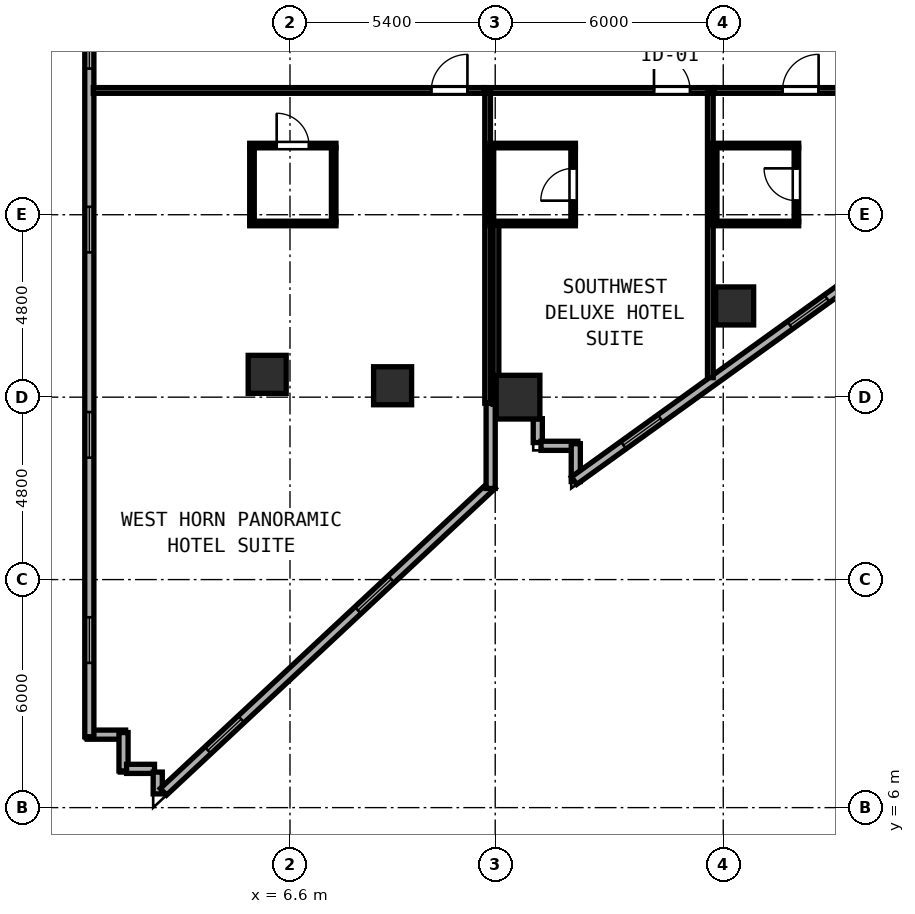
"""IFC4 building model, lengths in metres.
Left out: names, types, materials, properties, quantities, classifications, styles, units other than length and angle.
Written with IfcOpenShell. Run it as: python <this file> out.ifc"""

import sys

from ifc_helpers import new_model, si_unit, direction, frame, frame_2d, origin, origin_2d, place, context, subcontext, project, spatial, rectangle, hollow_rectangle, extrude, element, fill, save


model = new_model("IFC4")
c1 = context("Model", 3, precision=1e-05, world=origin(), true_north=direction((0.0, 1.0)))
c2 = subcontext(c1, "Body", "Model", "MODEL_VIEW")
j1 = project(units=[si_unit("LENGTHUNIT", "METRE"), si_unit("PLANEANGLEUNIT", "RADIAN")], contexts=[c1])
p1 = place(None, origin())
s1 = spatial("IfcSite", under=j1, at=p1, CompositionType="ELEMENT")
p2 = place(p1, origin())
s2 = spatial("IfcBuilding", under=s1, at=p2, CompositionType="ELEMENT")
p3 = place(p2, frame((0.0, 0.0, 70.4)))
s3 = spatial("IfcBuildingStorey", under=s2, at=p3, CompositionType="ELEMENT", Elevation=70.4)
p4 = place(p3, frame((12.6, 16.8, 0.0), z_axis=(0.0, 0.0, 1.0), x_axis=(1.0, 0.0, 0.0)))
e1 = element("IfcColumn", 1, at=p4, inside=s3, PredefinedType="COLUMN", context=c2, shape_type="SweptSolid", body=[
    extrude(hollow_rectangle(XDim=1.15, YDim=1.15, WallThickness=0.042, at=origin_2d()), origin(), (0.0, 0.0, 1.0), 3.8),
])
for number, where, z_axis, x_axis in (
    (2, (6.0, 17.4, 0.0), (0.0, 0.0, 1.0), (1.0, 0.0, 0.0)),
    (3, (18.3, 19.2, 0.0), (0.0, 0.0, 1.0), (1.0, 0.0, 0.0)),
    (4, (9.3, 17.1, 0.0), (0.0, 0.0, 1.0), (1.0, 0.0, 0.0)),
):
    element("IfcColumn", number, at=place(p3, frame(where, z_axis=z_axis, x_axis=x_axis)), inside=s3, PredefinedType="COLUMN", context=c2, shape_type="SweptSolid", body=[
        extrude(hollow_rectangle(XDim=1.0, YDim=1.0, WallThickness=0.038, at=origin_2d()), origin(), (0.0, 0.0, 1.0), 3.8),
    ])
for number, where, z_axis, x_axis in (
    (5, (1.265, 7.92, 0.0), (0.0, 0.0, 1.0), (1.0, 0.0, 0.0)),
    (6, (2.22, 7.975, 0.0), (0.0, 0.0, 1.0), (0.0, -1.0, 0.0)),
):
    element("IfcWall", number, at=place(p3, frame(where, z_axis=z_axis, x_axis=x_axis)), inside=s3, PredefinedType="SOLIDWALL", context=c2, shape_type="SweptSolid", body=[
        extrude(rectangle(XDim=1.01, YDim=0.24, at=frame_2d((0.505, 0.0))), origin(), (0.0, 0.0, 1.0), 3.6),
    ])
p5 = place(p3, frame((2.3, 7.02, 0.0), z_axis=(0.0, 0.0, 1.0), x_axis=(1.0, 0.0, 0.0)))
e7 = element("IfcWall", 7, at=p5, inside=s3, PredefinedType="SOLIDWALL", context=c2, shape_type="SweptSolid", body=[
    extrude(rectangle(XDim=0.735, YDim=0.24, at=frame_2d((0.367, 0.0))), origin(), (0.0, 0.0, 1.0), 3.6),
])
p6 = place(p3, frame((3.12, 6.935, 0.0), z_axis=(0.0, 0.0, 1.0), x_axis=(0.0, -1.0, 0.0)))
e8 = element("IfcWall", 8, at=p6, inside=s3, PredefinedType="SOLIDWALL", context=c2, shape_type="SweptSolid", body=[
    extrude(rectangle(XDim=0.574, YDim=0.24, at=frame_2d((0.287, 0.0))), origin(), (0.0, 0.0, 1.0), 3.6),
])
p7 = place(p3, frame((3.27, 6.416, 0.0), z_axis=(0.0, 0.0, 1.0), x_axis=(0.731064187858, 0.682308693505, 0.0)))
e9 = element("IfcWall", 9, at=p7, inside=s3, PredefinedType="SOLIDWALL", context=c2, shape_type="SweptSolid", body=[
    extrude(rectangle(XDim=11.833, YDim=0.24, at=frame_2d((5.916, 0.0))), origin(), (0.0, 0.0, 1.0), 3.6),
])
p8 = place(p7, frame((1.6, 0.0, 0.85)))
e10 = element("IfcOpeningElement", 10, at=p8, cuts=e9, PredefinedType="OPENING", context=c2, shape_type="SweptSolid", body=[
    extrude(rectangle(XDim=1.2, YDim=1.85, at=frame_2d((0.6, 0.925))), frame((0.0, 0.13, 0.0), z_axis=(0.0, -1.0, 0.0), x_axis=(1.0, 0.0, 0.0)), (0.0, 0.0, 1.0), 0.26),
])
p9 = place(p7, frame((7.0, 0.0, 0.85)))
e11 = element("IfcOpeningElement", 11, at=p9, cuts=e9, PredefinedType="OPENING", context=c2, shape_type="SweptSolid", body=[
    extrude(rectangle(XDim=1.2, YDim=1.85, at=frame_2d((0.6, 0.925))), frame((0.0, 0.13, 0.0), z_axis=(0.0, -1.0, 0.0), x_axis=(1.0, 0.0, 0.0)), (0.0, 0.0, 1.0), 0.26),
])
p10 = place(p3, frame((11.88, 14.397, 0.0), z_axis=(0.0, 0.0, 1.0), x_axis=(0.0, 1.0, 0.0)))
e12 = element("IfcWall", 12, at=p10, inside=s3, PredefinedType="SOLIDWALL", context=c2, shape_type="SweptSolid", body=[
    extrude(rectangle(XDim=2.243, YDim=0.24, at=frame_2d((1.121, 0.0))), origin(), (0.0, 0.0, 1.0), 3.6),
])
p11 = place(p3, frame((13.12, 16.233, 0.0), z_axis=(0.0, 0.0, 1.0), x_axis=(0.0, -1.0, 0.0)))
e13 = element("IfcWall", 13, at=p11, inside=s3, PredefinedType="SOLIDWALL", context=c2, shape_type="SweptSolid", body=[
    extrude(rectangle(XDim=0.628, YDim=0.24, at=frame_2d((0.314, 0.0))), origin(), (0.0, 0.0, 1.0), 3.6),
])
p12 = place(p3, frame((13.205, 15.52, 0.0), z_axis=(0.0, 0.0, 1.0), x_axis=(1.0, 0.0, 0.0)))
e14 = element("IfcWall", 14, at=p12, inside=s3, PredefinedType="SOLIDWALL", context=c2, shape_type="SweptSolid", body=[
    extrude(rectangle(XDim=0.97, YDim=0.24, at=frame_2d((0.485, 0.0))), origin(), (0.0, 0.0, 1.0), 3.6),
])
p13 = place(p3, frame((14.12, 15.575, 0.0), z_axis=(0.0, 0.0, 1.0), x_axis=(0.0, -1.0, 0.0)))
e15 = element("IfcWall", 15, at=p13, inside=s3, PredefinedType="SOLIDWALL", context=c2, shape_type="SweptSolid", body=[
    extrude(rectangle(XDim=0.996, YDim=0.24, at=frame_2d((0.498, 0.0))), origin(), (0.0, 0.0, 1.0), 3.6),
])
p14 = place(p3, frame((14.075, 14.602, 0.0), z_axis=(0.0, 0.0, 1.0), x_axis=(0.811543176492, 0.58429245476, 0.0)))
e16 = element("IfcWall", 16, at=p14, inside=s3, PredefinedType="SOLIDWALL", context=c2, shape_type="SweptSolid", body=[
    extrude(rectangle(XDim=11.531, YDim=0.24, at=frame_2d((5.765, 0.0))), origin(), (0.0, 0.0, 1.0), 3.097),
])
p15 = place(p14, frame((1.6, 0.0, 0.85)))
e17 = element("IfcOpeningElement", 17, at=p15, cuts=e16, PredefinedType="OPENING", context=c2, shape_type="SweptSolid", body=[
    extrude(rectangle(XDim=1.2, YDim=1.85, at=frame_2d((0.6, 0.925))), frame((0.0, 0.13, 0.0), z_axis=(0.0, -1.0, 0.0), x_axis=(1.0, 0.0, 0.0)), (0.0, 0.0, 1.0), 0.26),
])
p16 = place(p14, frame((7.0, 0.0, 0.85)))
e18 = element("IfcOpeningElement", 18, at=p16, cuts=e16, PredefinedType="OPENING", context=c2, shape_type="SweptSolid", body=[
    extrude(rectangle(XDim=1.2, YDim=1.85, at=frame_2d((0.6, 0.925))), frame((0.0, 0.13, 0.0), z_axis=(0.0, -1.0, 0.0), x_axis=(1.0, 0.0, 0.0)), (0.0, 0.0, 1.0), 0.26),
])
p17 = place(p3, frame((1.32, 28.808, 0.0), z_axis=(0.0, 0.0, 1.0), x_axis=(0.0, -1.0, 0.0)))
e19 = element("IfcWall", 19, at=p17, inside=s3, PredefinedType="SOLIDWALL", context=c2, shape_type="SweptSolid", body=[
    extrude(rectangle(XDim=20.943, YDim=0.24, at=frame_2d((10.472, 0.0))), origin(), (0.0, 0.0, 1.0), 3.6),
])
p18 = place(p17, frame((2.163, 0.0, 0.85)))
e20 = element("IfcOpeningElement", 20, at=p18, cuts=e19, PredefinedType="OPENING", context=c2, shape_type="SweptSolid", body=[
    extrude(rectangle(XDim=1.2, YDim=1.85, at=frame_2d((0.6, 0.925))), frame((0.0, 0.13, 0.0), z_axis=(0.0, -1.0, 0.0), x_axis=(1.0, 0.0, 0.0)), (0.0, 0.0, 1.0), 0.26),
])
p19 = place(p17, frame((7.0, 0.0, 0.85)))
e21 = element("IfcOpeningElement", 21, at=p19, cuts=e19, PredefinedType="OPENING", context=c2, shape_type="SweptSolid", body=[
    extrude(rectangle(XDim=1.2, YDim=1.85, at=frame_2d((0.6, 0.925))), frame((0.0, 0.13, 0.0), z_axis=(0.0, -1.0, 0.0), x_axis=(1.0, 0.0, 0.0)), (0.0, 0.0, 1.0), 0.26),
])
p20 = place(p17, frame((12.4, 0.0, 0.85)))
e22 = element("IfcOpeningElement", 22, at=p20, cuts=e19, PredefinedType="OPENING", context=c2, shape_type="SweptSolid", body=[
    extrude(rectangle(XDim=1.2, YDim=1.85, at=frame_2d((0.6, 0.925))), frame((0.0, 0.13, 0.0), z_axis=(0.0, -1.0, 0.0), x_axis=(1.0, 0.0, 0.0)), (0.0, 0.0, 1.0), 0.26),
])
p21 = place(p17, frame((17.8, 0.0, 0.85)))
e23 = element("IfcOpeningElement", 23, at=p21, cuts=e19, PredefinedType="OPENING", context=c2, shape_type="SweptSolid", body=[
    extrude(rectangle(XDim=1.2, YDim=1.85, at=frame_2d((0.6, 0.925))), frame((0.0, 0.13, 0.0), z_axis=(0.0, -1.0, 0.0), x_axis=(1.0, 0.0, 0.0)), (0.0, 0.0, 1.0), 0.26),
])
p22 = place(p3, frame((11.7, 24.87, 0.0), z_axis=(0.0, 0.0, 1.0), x_axis=(1.0, 0.0, 0.0)))
e24 = element("IfcWall", 24, at=p22, inside=s3, PredefinedType="PARTITIONING", context=c2, shape_type="SweptSolid", body=[
    extrude(rectangle(XDim=6.06, YDim=0.15, at=frame_2d((3.03, 0.0))), origin(), (0.0, 0.0, 1.0), 3.185),
])
p23 = place(p22, frame((5.427, 0.0, 0.0), z_axis=(0.0, 0.0, 1.0), x_axis=(-1.0, 0.0, 0.0)))
e25 = element("IfcOpeningElement", 25, at=p23, cuts=e24, PredefinedType="OPENING", context=c2, shape_type="SweptSolid", body=[
    extrude(rectangle(XDim=0.95, YDim=2.18, at=frame_2d((0.475, 1.09))), frame((0.0, 0.085, 0.0), z_axis=(0.0, -1.0, 0.0), x_axis=(1.0, 0.0, 0.0)), (0.0, 0.0, 1.0), 0.17),
])
p24 = place(p3, frame((11.8, 16.642, 0.0), z_axis=(0.0, 0.0, 1.0), x_axis=(0.0, 1.0, 0.0)))
e26 = element("IfcWall", 26, at=p24, inside=s3, PredefinedType="PARTITIONING", context=c2, shape_type="SweptSolid", body=[
    extrude(rectangle(XDim=8.168, YDim=0.15, at=frame_2d((4.084, 0.0))), origin(), (0.0, 0.0, 1.0), 3.6),
])
p25 = place(p3, frame((17.66, 17.312, 0.0), z_axis=(0.0, 0.0, 1.0), x_axis=(0.0, 1.0, 0.0)))
e27 = element("IfcWall", 27, at=p25, inside=s3, PredefinedType="PARTITIONING", context=c2, shape_type="SweptSolid", body=[
    extrude(rectangle(XDim=7.498, YDim=0.15, at=frame_2d((3.749, 0.0))), origin(), (0.0, 0.0, 1.0), 3.6),
])
for number, where, z_axis, x_axis in (
    (28, (11.86, 23.42, 0.0), (0.0, 0.0, 1.0), (1.0, 0.0, 0.0)),
    (29, (11.86, 21.37, 0.0), (0.0, 0.0, 1.0), (1.0, 0.0, 0.0)),
):
    element("IfcWall", number, at=place(p3, frame(where, z_axis=z_axis, x_axis=x_axis)), inside=s3, PredefinedType="PARTITIONING", context=c2, shape_type="SweptSolid", body=[
        extrude(rectangle(XDim=2.25, YDim=0.12, at=frame_2d((1.125, 0.0))), origin(), (0.0, 0.0, 1.0), 3.6),
    ])
p26 = place(p3, frame((11.9, 21.415, 0.0), z_axis=(0.0, 0.0, 1.0), x_axis=(0.0, 1.0, 0.0)))
e30 = element("IfcWall", 30, at=p26, inside=s3, PredefinedType="PARTITIONING", context=c2, shape_type="SweptSolid", body=[
    extrude(rectangle(XDim=1.96, YDim=0.12, at=frame_2d((0.98, 0.0))), origin(), (0.0, 0.0, 1.0), 3.6),
])
p27 = place(p3, frame((14.05, 21.415, 0.0), z_axis=(0.0, 0.0, 1.0), x_axis=(0.0, 1.0, 0.0)))
e31 = element("IfcWall", 31, at=p27, inside=s3, PredefinedType="PARTITIONING", context=c2, shape_type="SweptSolid", body=[
    extrude(rectangle(XDim=1.96, YDim=0.12, at=frame_2d((0.98, 0.0))), origin(), (0.0, 0.0, 1.0), 3.6),
])
p28 = place(p27, frame((0.555, 0.0, 0.0)))
e32 = element("IfcOpeningElement", 32, at=p28, cuts=e31, PredefinedType="OPENING", context=c2, shape_type="SweptSolid", body=[
    extrude(rectangle(XDim=0.85, YDim=2.1, at=frame_2d((0.425, 1.05))), frame((0.0, 0.07, 0.0), z_axis=(0.0, -1.0, 0.0), x_axis=(1.0, 0.0, 0.0)), (0.0, 0.0, 1.0), 0.14),
])
p29 = place(p3, frame((17.762, 24.87, 0.0), z_axis=(0.0, 0.0, 1.0), x_axis=(1.0, 0.0, 0.0)))
e33 = element("IfcWall", 33, at=p29, inside=s3, PredefinedType="PARTITIONING", context=c2, shape_type="SweptSolid", body=[
    extrude(rectangle(XDim=6.338, YDim=0.15, at=frame_2d((3.169, 0.0))), origin(), (0.0, 0.0, 1.0), 3.185),
])
p30 = place(p29, frame((2.747, 0.0, 0.0), z_axis=(0.0, 0.0, 1.0), x_axis=(-1.0, 0.0, 0.0)))
e34 = element("IfcOpeningElement", 34, at=p30, cuts=e33, PredefinedType="OPENING", context=c2, shape_type="SweptSolid", body=[
    extrude(rectangle(XDim=0.95, YDim=2.18, at=frame_2d((0.475, 1.09))), frame((0.0, 0.085, 0.0), z_axis=(0.0, -1.0, 0.0), x_axis=(1.0, 0.0, 0.0)), (0.0, 0.0, 1.0), 0.17),
])
for number, where, z_axis, x_axis in (
    (35, (17.72, 23.42, 0.0), (0.0, 0.0, 1.0), (1.0, 0.0, 0.0)),
    (36, (17.72, 21.37, 0.0), (0.0, 0.0, 1.0), (1.0, 0.0, 0.0)),
):
    element("IfcWall", number, at=place(p3, frame(where, z_axis=z_axis, x_axis=x_axis)), inside=s3, PredefinedType="PARTITIONING", context=c2, shape_type="SweptSolid", body=[
        extrude(rectangle(XDim=2.265, YDim=0.12, at=frame_2d((1.133, 0.0))), origin(), (0.0, 0.0, 1.0), 3.6),
    ])
p31 = place(p3, frame((17.775, 21.415, 0.0), z_axis=(0.0, 0.0, 1.0), x_axis=(0.0, 1.0, 0.0)))
e37 = element("IfcWall", 37, at=p31, inside=s3, PredefinedType="PARTITIONING", context=c2, shape_type="SweptSolid", body=[
    extrude(rectangle(XDim=1.96, YDim=0.12, at=frame_2d((0.98, 0.0))), origin(), (0.0, 0.0, 1.0), 3.6),
])
p32 = place(p3, frame((19.925, 21.415, 0.0), z_axis=(0.0, 0.0, 1.0), x_axis=(0.0, 1.0, 0.0)))
e38 = element("IfcWall", 38, at=p32, inside=s3, PredefinedType="PARTITIONING", context=c2, shape_type="SweptSolid", body=[
    extrude(rectangle(XDim=1.96, YDim=0.12, at=frame_2d((0.98, 0.0))), origin(), (0.0, 0.0, 1.0), 3.6),
])
p33 = place(p32, frame((0.555, 0.0, 0.0)))
e39 = element("IfcOpeningElement", 39, at=p33, cuts=e38, PredefinedType="OPENING", context=c2, shape_type="SweptSolid", body=[
    extrude(rectangle(XDim=0.85, YDim=2.1, at=frame_2d((0.425, 1.05))), frame((0.0, 0.07, 0.0), z_axis=(0.0, -1.0, 0.0), x_axis=(1.0, 0.0, 0.0)), (0.0, 0.0, 1.0), 0.14),
])
p34 = place(p3, frame((1.425, 24.87, 0.0), z_axis=(0.0, 0.0, 1.0), x_axis=(1.0, 0.0, 0.0)))
e40 = element("IfcWall", 40, at=p34, inside=s3, PredefinedType="PARTITIONING", context=c2, shape_type="SweptSolid", body=[
    extrude(rectangle(XDim=10.273, YDim=0.15, at=frame_2d((5.136, 0.0))), origin(), (0.0, 0.0, 1.0), 3.6),
])
p35 = place(p34, frame((9.844, 0.0, 0.0), z_axis=(0.0, 0.0, 1.0), x_axis=(-1.0, 0.0, 0.0)))
e41 = element("IfcOpeningElement", 41, at=p35, cuts=e40, PredefinedType="OPENING", context=c2, shape_type="SweptSolid", body=[
    extrude(rectangle(XDim=0.95, YDim=2.18, at=frame_2d((0.475, 1.09))), frame((0.0, 0.085, 0.0), z_axis=(0.0, -1.0, 0.0), x_axis=(1.0, 0.0, 0.0)), (0.0, 0.0, 1.0), 0.17),
])
p36 = place(p3, frame((12.02, 16.612, 0.0), z_axis=(0.0, 0.0, 1.0), x_axis=(0.0, 1.0, 0.0)))
e42 = element("IfcWall", 42, at=p36, inside=s3, PredefinedType="PARTITIONING", context=c2, shape_type="SweptSolid", body=[
    extrude(rectangle(XDim=4.713, YDim=0.15, at=frame_2d((2.356, 0.0))), origin(), (0.0, 0.0, 1.0), 3.6),
])
p37 = place(p3, frame((5.54, 23.42, 0.0), z_axis=(0.0, 0.0, 1.0), x_axis=(1.0, 0.0, 0.0)))
e43 = element("IfcWall", 43, at=p37, inside=s3, PredefinedType="PARTITIONING", context=c2, shape_type="SweptSolid", body=[
    extrude(rectangle(XDim=2.27, YDim=0.12, at=frame_2d((1.135, 0.0))), origin(), (0.0, 0.0, 1.0), 3.6),
])
p38 = place(p37, frame((1.56, 0.0, 0.0), z_axis=(0.0, 0.0, 1.0), x_axis=(-1.0, 0.0, 0.0)))
e44 = element("IfcOpeningElement", 44, at=p38, cuts=e43, PredefinedType="OPENING", context=c2, shape_type="SweptSolid", body=[
    extrude(rectangle(XDim=0.85, YDim=2.1, at=frame_2d((0.425, 1.05))), frame((0.0, 0.07, 0.0), z_axis=(0.0, -1.0, 0.0), x_axis=(1.0, 0.0, 0.0)), (0.0, 0.0, 1.0), 0.14),
])
p39 = place(p3, frame((5.54, 21.37, 0.0), z_axis=(0.0, 0.0, 1.0), x_axis=(1.0, 0.0, 0.0)))
e45 = element("IfcWall", 45, at=p39, inside=s3, PredefinedType="PARTITIONING", context=c2, shape_type="SweptSolid", body=[
    extrude(rectangle(XDim=2.27, YDim=0.12, at=frame_2d((1.135, 0.0))), origin(), (0.0, 0.0, 1.0), 3.6),
])
for number, where, z_axis, x_axis in (
    (46, (5.6, 21.415, 0.0), (0.0, 0.0, 1.0), (0.0, 1.0, 0.0)),
    (47, (7.75, 21.415, 0.0), (0.0, 0.0, 1.0), (0.0, 1.0, 0.0)),
):
    element("IfcWall", number, at=place(p3, frame(where, z_axis=z_axis, x_axis=x_axis)), inside=s3, PredefinedType="PARTITIONING", context=c2, shape_type="SweptSolid", body=[
        extrude(rectangle(XDim=1.96, YDim=0.12, at=frame_2d((0.98, 0.0))), origin(), (0.0, 0.0, 1.0), 3.6),
    ])
p40 = place(p8, origin())
e48 = element("IfcWindow", 48, at=p40, inside=s3, PartitioningType="SINGLE_PANEL", PredefinedType="WINDOW", context=c2, shape_type="SweptSolid", body=[
    extrude(rectangle(XDim=1.2, YDim=1.85, at=frame_2d((0.6, 0.925))), frame((0.0, 0.03, 0.0), z_axis=(0.0, -1.0, 0.0), x_axis=(1.0, 0.0, 0.0)), (0.0, 0.0, 1.0), 0.06),
])
fill(e10, e48)
p41 = place(p9, origin())
e49 = element("IfcWindow", 49, at=p41, inside=s3, PartitioningType="SINGLE_PANEL", PredefinedType="WINDOW", context=c2, shape_type="SweptSolid", body=[
    extrude(rectangle(XDim=1.2, YDim=1.85, at=frame_2d((0.6, 0.925))), frame((0.0, 0.03, 0.0), z_axis=(0.0, -1.0, 0.0), x_axis=(1.0, 0.0, 0.0)), (0.0, 0.0, 1.0), 0.06),
])
fill(e11, e49)
p42 = place(p15, origin())
e50 = element("IfcWindow", 50, at=p42, inside=s3, PartitioningType="SINGLE_PANEL", PredefinedType="WINDOW", context=c2, shape_type="SweptSolid", body=[
    extrude(rectangle(XDim=1.2, YDim=1.85, at=frame_2d((0.6, 0.925))), frame((0.0, 0.03, 0.0), z_axis=(0.0, -1.0, 0.0), x_axis=(1.0, 0.0, 0.0)), (0.0, 0.0, 1.0), 0.06),
])
fill(e17, e50)
p43 = place(p16, origin())
e51 = element("IfcWindow", 51, at=p43, inside=s3, PartitioningType="SINGLE_PANEL", PredefinedType="WINDOW", context=c2, shape_type="SweptSolid", body=[
    extrude(rectangle(XDim=1.2, YDim=1.85, at=frame_2d((0.6, 0.925))), frame((0.0, 0.03, 0.0), z_axis=(0.0, -1.0, 0.0), x_axis=(1.0, 0.0, 0.0)), (0.0, 0.0, 1.0), 0.06),
])
fill(e18, e51)
p44 = place(p18, origin())
e52 = element("IfcWindow", 52, at=p44, inside=s3, PartitioningType="SINGLE_PANEL", PredefinedType="WINDOW", context=c2, shape_type="SweptSolid", body=[
    extrude(rectangle(XDim=1.2, YDim=1.85, at=frame_2d((0.6, 0.925))), frame((0.0, 0.03, 0.0), z_axis=(0.0, -1.0, 0.0), x_axis=(1.0, 0.0, 0.0)), (0.0, 0.0, 1.0), 0.06),
])
fill(e20, e52)
p45 = place(p19, origin())
e53 = element("IfcWindow", 53, at=p45, inside=s3, PartitioningType="SINGLE_PANEL", PredefinedType="WINDOW", context=c2, shape_type="SweptSolid", body=[
    extrude(rectangle(XDim=1.2, YDim=1.85, at=frame_2d((0.6, 0.925))), frame((0.0, 0.03, 0.0), z_axis=(0.0, -1.0, 0.0), x_axis=(1.0, 0.0, 0.0)), (0.0, 0.0, 1.0), 0.06),
])
fill(e21, e53)
p46 = place(p20, origin())
e54 = element("IfcWindow", 54, at=p46, inside=s3, PartitioningType="SINGLE_PANEL", PredefinedType="WINDOW", context=c2, shape_type="SweptSolid", body=[
    extrude(rectangle(XDim=1.2, YDim=1.85, at=frame_2d((0.6, 0.925))), frame((0.0, 0.03, 0.0), z_axis=(0.0, -1.0, 0.0), x_axis=(1.0, 0.0, 0.0)), (0.0, 0.0, 1.0), 0.06),
])
fill(e22, e54)
p47 = place(p21, origin())
e55 = element("IfcWindow", 55, at=p47, inside=s3, PartitioningType="SINGLE_PANEL", PredefinedType="WINDOW", context=c2, shape_type="SweptSolid", body=[
    extrude(rectangle(XDim=1.2, YDim=1.85, at=frame_2d((0.6, 0.925))), frame((0.0, 0.03, 0.0), z_axis=(0.0, -1.0, 0.0), x_axis=(1.0, 0.0, 0.0)), (0.0, 0.0, 1.0), 0.06),
])
fill(e23, e55)
p48 = place(p23, origin())
e56 = element("IfcDoor", 56, at=p48, inside=s3, OperationType="SINGLE_SWING_RIGHT", PredefinedType="DOOR", context=c2, shape_type="SweptSolid", body=[
    extrude(rectangle(XDim=0.95, YDim=2.18, at=frame_2d((0.475, 1.09))), frame((0.0, 0.025, 0.0), z_axis=(0.0, -1.0, 0.0), x_axis=(1.0, 0.0, 0.0)), (0.0, 0.0, 1.0), 0.05),
])
fill(e25, e56)
p49 = place(p28, origin())
e57 = element("IfcDoor", 57, at=p49, inside=s3, OperationType="SINGLE_SWING_LEFT", PredefinedType="DOOR", context=c2, shape_type="SweptSolid", body=[
    extrude(rectangle(XDim=0.85, YDim=2.1, at=frame_2d((0.425, 1.05))), frame((0.0, 0.025, 0.0), z_axis=(0.0, -1.0, 0.0), x_axis=(1.0, 0.0, 0.0)), (0.0, 0.0, 1.0), 0.05),
])
fill(e32, e57)
p50 = place(p30, origin())
e58 = element("IfcDoor", 58, at=p50, inside=s3, OperationType="SINGLE_SWING_LEFT", PredefinedType="DOOR", context=c2, shape_type="SweptSolid", body=[
    extrude(rectangle(XDim=0.95, YDim=2.18, at=frame_2d((0.475, 1.09))), frame((0.0, 0.025, 0.0), z_axis=(0.0, -1.0, 0.0), x_axis=(1.0, 0.0, 0.0)), (0.0, 0.0, 1.0), 0.05),
])
fill(e34, e58)
p51 = place(p33, origin())
e59 = element("IfcDoor", 59, at=p51, inside=s3, OperationType="SINGLE_SWING_RIGHT", PredefinedType="DOOR", context=c2, shape_type="SweptSolid", body=[
    extrude(rectangle(XDim=0.85, YDim=2.1, at=frame_2d((0.425, 1.05))), frame((0.0, 0.025, 0.0), z_axis=(0.0, -1.0, 0.0), x_axis=(1.0, 0.0, 0.0)), (0.0, 0.0, 1.0), 0.05),
])
fill(e39, e59)
p52 = place(p35, origin())
e60 = element("IfcDoor", 60, at=p52, inside=s3, OperationType="SINGLE_SWING_LEFT", PredefinedType="DOOR", context=c2, shape_type="SweptSolid", body=[
    extrude(rectangle(XDim=0.95, YDim=2.18, at=frame_2d((0.475, 1.09))), frame((0.0, 0.025, 0.0), z_axis=(0.0, -1.0, 0.0), x_axis=(1.0, 0.0, 0.0)), (0.0, 0.0, 1.0), 0.05),
])
fill(e41, e60)
p53 = place(p38, origin())
e61 = element("IfcDoor", 61, at=p53, inside=s3, OperationType="SINGLE_SWING_RIGHT", PredefinedType="DOOR", context=c2, shape_type="SweptSolid", body=[
    extrude(rectangle(XDim=0.85, YDim=2.1, at=frame_2d((0.425, 1.05))), frame((0.0, 0.025, 0.0), z_axis=(0.0, -1.0, 0.0), x_axis=(1.0, 0.0, 0.0)), (0.0, 0.0, 1.0), 0.05),
])
fill(e44, e61)
save(model, sys.argv[1])
